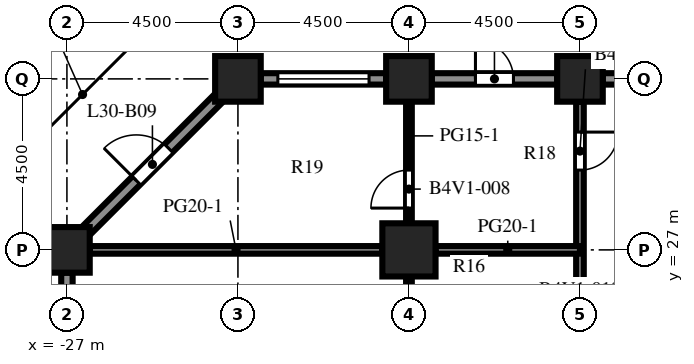
"""IFC4 building model, lengths in metres.
Left out: names, types, materials, properties, quantities, classifications, styles, units other than length and angle.
Written with IfcOpenShell. Run it as: python <this file> out.ifc"""

import sys

from ifc_helpers import new_model, si_unit, direction, frame, frame_2d, origin, origin_2d, place, context, subcontext, project, spatial, rectangle, extrude, element, fill, save


model = new_model("IFC4")
c1 = context("Model", 3, precision=1e-05, world=origin(), true_north=direction((0.0, 1.0)))
c2 = subcontext(c1, "Body", "Model", "MODEL_VIEW")
j1 = project(units=[si_unit("LENGTHUNIT", "METRE"), si_unit("PLANEANGLEUNIT", "RADIAN")], contexts=[c1])
p1 = place(None, origin())
s1 = spatial("IfcSite", under=j1, at=p1, CompositionType="ELEMENT")
p2 = place(p1, origin())
s2 = spatial("IfcBuilding", under=s1, at=p2, CompositionType="ELEMENT")
p3 = place(p2, frame((0.0, 0.0, 133.1)))
s3 = spatial("IfcBuildingStorey", under=s2, at=p3, CompositionType="ELEMENT", Elevation=133.1)
for number, where, z_axis, x_axis in (
    (1, (-27.0, 27.0, 0.0), (0.0, 0.0, 1.0), (1.0, 0.0, 0.0)),
    (2, (-22.5, 31.5, 0.0), (0.0, 0.0, 1.0), (1.0, 0.0, 0.0)),
    (3, (-18.0, 31.5, 0.0), (0.0, 0.0, 1.0), (1.0, 0.0, 0.0)),
    (4, (-13.5, 31.5, 0.0), (0.0, 0.0, 1.0), (1.0, 0.0, 0.0)),
):
    element("IfcColumn", number, at=place(p3, frame(where, z_axis=z_axis, x_axis=x_axis)), inside=s3, PredefinedType="COLUMN", context=c2, shape_type="SweptSolid", body=[
        extrude(rectangle(XDim=1.2, YDim=1.2, at=origin_2d()), origin(), (0.0, 0.0, 1.0), 4.1),
    ])
p4 = place(p3, frame((-18.0, 27.0, 0.0), z_axis=(0.0, 0.0, 1.0), x_axis=(1.0, 0.0, 0.0)))
e5 = element("IfcColumn", 5, at=p4, inside=s3, PredefinedType="COLUMN", context=c2, shape_type="SweptSolid", body=[
    extrude(rectangle(XDim=1.4, YDim=1.4, at=origin_2d()), origin(), (0.0, 0.0, 1.0), 4.1),
])
p5 = place(p3, frame((-12.9, 31.5, 0.0), z_axis=(0.0, 0.0, 1.0), x_axis=(1.0, 0.0, 0.0)))
e6 = element("IfcWall", 6, at=p5, inside=s3, PredefinedType="SOLIDWALL", context=c2, shape_type="SweptSolid", body=[
    extrude(rectangle(XDim=3.3, YDim=0.3, at=frame_2d((1.65, 0.0))), origin(), (0.0, 0.0, 1.0), 2.75),
])
p6 = place(p5, frame((0.525, 0.0, 0.8)))
e7 = element("IfcOpeningElement", 7, at=p6, cuts=e6, PredefinedType="OPENING", context=c2, shape_type="SweptSolid", body=[
    extrude(rectangle(XDim=1.2, YDim=1.7, at=frame_2d((0.6, 0.85))), frame((0.0, 0.16, 0.0), z_axis=(0.0, -1.0, 0.0), x_axis=(1.0, 0.0, 0.0)), (0.0, 0.0, 1.0), 0.32),
])
p7 = place(p3, frame((-17.4, 31.5, 0.0), z_axis=(0.0, 0.0, 1.0), x_axis=(1.0, 0.0, 0.0)))
e8 = element("IfcWall", 8, at=p7, inside=s3, PredefinedType="SOLIDWALL", context=c2, shape_type="SweptSolid", body=[
    extrude(rectangle(XDim=3.3, YDim=0.3, at=frame_2d((1.65, 0.0))), origin(), (0.0, 0.0, 1.0), 2.75),
])
p8 = place(p7, frame((1.15, 0.0, 0.0)))
e9 = element("IfcOpeningElement", 9, at=p8, cuts=e8, PredefinedType="OPENING", context=c2, shape_type="SweptSolid", body=[
    extrude(rectangle(XDim=1.0, YDim=2.2, at=frame_2d((0.5, 1.1))), frame((0.0, 0.16, 0.0), z_axis=(0.0, -1.0, 0.0), x_axis=(1.0, 0.0, 0.0)), (0.0, 0.0, 1.0), 0.32),
])
p9 = place(p3, frame((-21.9, 31.5, 0.0), z_axis=(0.0, 0.0, 1.0), x_axis=(1.0, 0.0, 0.0)))
e10 = element("IfcWall", 10, at=p9, inside=s3, PredefinedType="SOLIDWALL", context=c2, shape_type="SweptSolid", body=[
    extrude(rectangle(XDim=3.3, YDim=0.3, at=frame_2d((1.65, 0.0))), origin(), (0.0, 0.0, 1.0), 2.75),
])
p10 = place(p9, frame((0.45, 0.0, 0.8)))
e11 = element("IfcOpeningElement", 11, at=p10, cuts=e10, PredefinedType="OPENING", context=c2, shape_type="SweptSolid", body=[
    extrude(rectangle(XDim=2.4, YDim=1.7, at=frame_2d((1.2, 0.85))), frame((0.0, 0.16, 0.0), z_axis=(0.0, -1.0, 0.0), x_axis=(1.0, 0.0, 0.0)), (0.0, 0.0, 1.0), 0.32),
])
p11 = place(p3, frame((-26.506, 27.494, 0.0), z_axis=(0.0, 0.0, 1.0), x_axis=(0.707106781187, 0.707106781187, 0.0)))
e12 = element("IfcWall", 12, at=p11, inside=s3, PredefinedType="SOLIDWALL", context=c2, shape_type="SweptSolid", body=[
    extrude(rectangle(XDim=4.967, YDim=0.3, at=frame_2d((2.483, 0.0))), origin(), (0.0, 0.0, 1.0), 2.75),
])
p12 = place(p11, frame((1.884, 0.0, 0.0)))
e13 = element("IfcOpeningElement", 13, at=p12, cuts=e12, PredefinedType="OPENING", context=c2, shape_type="SweptSolid", body=[
    extrude(rectangle(XDim=1.2, YDim=2.2, at=frame_2d((0.6, 1.1))), frame((0.0, 0.16, 0.0), z_axis=(0.0, -1.0, 0.0), x_axis=(1.0, 0.0, 0.0)), (0.0, 0.0, 1.0), 0.32),
])
p13 = place(p3, frame((-27.0, 23.1, 0.0), z_axis=(0.0, 0.0, 1.0), x_axis=(0.0, 1.0, 0.0)))
e14 = element("IfcWall", 14, at=p13, inside=s3, PredefinedType="SOLIDWALL", context=c2, shape_type="SweptSolid", body=[
    extrude(rectangle(XDim=3.3, YDim=0.3, at=frame_2d((1.65, 0.0))), origin(), (0.0, 0.0, 1.0), 2.75),
])
p14 = place(p13, frame((0.45, 0.0, 0.8)))
e15 = element("IfcOpeningElement", 15, at=p14, cuts=e14, PredefinedType="OPENING", context=c2, shape_type="SweptSolid", body=[
    extrude(rectangle(XDim=2.4, YDim=1.7, at=frame_2d((1.2, 0.85))), frame((0.0, 0.16, 0.0), z_axis=(0.0, -1.0, 0.0), x_axis=(1.0, 0.0, 0.0)), (0.0, 0.0, 1.0), 0.32),
])
p15 = place(p3, frame((-18.0, 23.2, 0.0), z_axis=(0.0, 0.0, 1.0), x_axis=(0.0, 1.0, 0.0)))
e16 = element("IfcWall", 16, at=p15, inside=s3, PredefinedType="PARTITIONING", context=c2, shape_type="SweptSolid", body=[
    extrude(rectangle(XDim=3.1, YDim=0.15, at=frame_2d((1.55, 0.0))), origin(), (0.0, 0.0, 1.0), 3.65),
])
p16 = place(p15, frame((0.65, 0.0, 0.0)))
e17 = element("IfcOpeningElement", 17, at=p16, cuts=e16, PredefinedType="OPENING", context=c2, shape_type="SweptSolid", body=[
    extrude(rectangle(XDim=1.0, YDim=2.1, at=frame_2d((0.5, 1.05))), frame((0.0, 0.085, 0.0), z_axis=(0.0, -1.0, 0.0), x_axis=(1.0, 0.0, 0.0)), (0.0, 0.0, 1.0), 0.17),
])
p17 = place(p3, frame((-18.0, 27.7, 0.0), z_axis=(0.0, 0.0, 1.0), x_axis=(0.0, 1.0, 0.0)))
e18 = element("IfcWall", 18, at=p17, inside=s3, PredefinedType="PARTITIONING", context=c2, shape_type="SweptSolid", body=[
    extrude(rectangle(XDim=3.2, YDim=0.15, at=frame_2d((1.6, 0.0))), origin(), (0.0, 0.0, 1.0), 3.65),
])
p18 = place(p17, frame((0.4, 0.0, 0.0)))
e19 = element("IfcOpeningElement", 19, at=p18, cuts=e18, PredefinedType="OPENING", context=c2, shape_type="SweptSolid", body=[
    extrude(rectangle(XDim=1.0, YDim=2.1, at=frame_2d((0.5, 1.05))), frame((0.0, 0.085, 0.0), z_axis=(0.0, -1.0, 0.0), x_axis=(1.0, 0.0, 0.0)), (0.0, 0.0, 1.0), 0.17),
])
p19 = place(p3, frame((-13.5, -21.9, 0.0), z_axis=(0.0, 0.0, 1.0), x_axis=(0.0, 1.0, 0.0)))
e20 = element("IfcWall", 20, at=p19, inside=s3, PredefinedType="PARTITIONING", context=c2, shape_type="SweptSolid", body=[
    extrude(rectangle(XDim=52.8, YDim=0.2, at=frame_2d((26.4, 0.0))), origin(), (0.0, 0.0, 1.0), 3.65),
])
p20 = place(p19, frame((3.25, 0.0, 0.0)))
e21 = element("IfcOpeningElement", 21, at=p20, cuts=e20, PredefinedType="OPENING", context=c2, shape_type="SweptSolid", body=[
    extrude(rectangle(XDim=1.0, YDim=2.1, at=frame_2d((0.5, 1.05))), frame((0.0, 0.11, 0.0), z_axis=(0.0, -1.0, 0.0), x_axis=(1.0, 0.0, 0.0)), (0.0, 0.0, 1.0), 0.22),
])
p21 = place(p19, frame((10.0, 0.0, 0.0)))
e22 = element("IfcOpeningElement", 22, at=p21, cuts=e20, PredefinedType="OPENING", context=c2, shape_type="SweptSolid", body=[
    extrude(rectangle(XDim=1.0, YDim=2.1, at=frame_2d((0.5, 1.05))), frame((0.0, 0.11, 0.0), z_axis=(0.0, -1.0, 0.0), x_axis=(1.0, 0.0, 0.0)), (0.0, 0.0, 1.0), 0.22),
])
p22 = place(p19, frame((21.0, 0.0, 0.0)))
e23 = element("IfcOpeningElement", 23, at=p22, cuts=e20, PredefinedType="OPENING", context=c2, shape_type="SweptSolid", body=[
    extrude(rectangle(XDim=1.0, YDim=2.1, at=frame_2d((0.5, 1.05))), frame((0.0, 0.11, 0.0), z_axis=(0.0, -1.0, 0.0), x_axis=(1.0, 0.0, 0.0)), (0.0, 0.0, 1.0), 0.22),
])
p23 = place(p19, frame((27.75, 0.0, 0.0)))
e24 = element("IfcOpeningElement", 24, at=p23, cuts=e20, PredefinedType="OPENING", context=c2, shape_type="SweptSolid", body=[
    extrude(rectangle(XDim=1.0, YDim=2.1, at=frame_2d((0.5, 1.05))), frame((0.0, 0.11, 0.0), z_axis=(0.0, -1.0, 0.0), x_axis=(1.0, 0.0, 0.0)), (0.0, 0.0, 1.0), 0.22),
])
p24 = place(p19, frame((34.75, 0.0, 0.0)))
e25 = element("IfcOpeningElement", 25, at=p24, cuts=e20, PredefinedType="OPENING", context=c2, shape_type="SweptSolid", body=[
    extrude(rectangle(XDim=1.0, YDim=2.1, at=frame_2d((0.5, 1.05))), frame((0.0, 0.11, 0.0), z_axis=(0.0, -1.0, 0.0), x_axis=(1.0, 0.0, 0.0)), (0.0, 0.0, 1.0), 0.22),
])
p25 = place(p19, frame((42.0, 0.0, 0.0)))
e26 = element("IfcOpeningElement", 26, at=p25, cuts=e20, PredefinedType="OPENING", context=c2, shape_type="SweptSolid", body=[
    extrude(rectangle(XDim=1.0, YDim=2.1, at=frame_2d((0.5, 1.05))), frame((0.0, 0.11, 0.0), z_axis=(0.0, -1.0, 0.0), x_axis=(1.0, 0.0, 0.0)), (0.0, 0.0, 1.0), 0.22),
])
p26 = place(p19, frame((46.25, 0.0, 0.0)))
e27 = element("IfcOpeningElement", 27, at=p26, cuts=e20, PredefinedType="OPENING", context=c2, shape_type="SweptSolid", body=[
    extrude(rectangle(XDim=1.0, YDim=2.1, at=frame_2d((0.5, 1.05))), frame((0.0, 0.11, 0.0), z_axis=(0.0, -1.0, 0.0), x_axis=(1.0, 0.0, 0.0)), (0.0, 0.0, 1.0), 0.22),
])
p27 = place(p19, frame((51.0, 0.0, 0.0)))
e28 = element("IfcOpeningElement", 28, at=p27, cuts=e20, PredefinedType="OPENING", context=c2, shape_type="SweptSolid", body=[
    extrude(rectangle(XDim=1.0, YDim=2.1, at=frame_2d((0.5, 1.05))), frame((0.0, 0.11, 0.0), z_axis=(0.0, -1.0, 0.0), x_axis=(1.0, 0.0, 0.0)), (0.0, 0.0, 1.0), 0.22),
])
p28 = place(p3, frame((-26.4, 27.0, 0.0), z_axis=(0.0, 0.0, 1.0), x_axis=(1.0, 0.0, 0.0)))
e29 = element("IfcWall", 29, at=p28, inside=s3, PredefinedType="PARTITIONING", context=c2, shape_type="SweptSolid", body=[
    extrude(rectangle(XDim=7.7, YDim=0.2, at=frame_2d((3.85, 0.0))), origin(), (0.0, 0.0, 1.0), 3.65),
])
p29 = place(p3, frame((-17.3, 27.0, 0.0), z_axis=(0.0, 0.0, 1.0), x_axis=(1.0, 0.0, 0.0)))
e30 = element("IfcWall", 30, at=p29, inside=s3, PredefinedType="PARTITIONING", context=c2, shape_type="SweptSolid", body=[
    extrude(rectangle(XDim=3.8, YDim=0.2, at=frame_2d((1.9, 0.0))), origin(), (0.0, 0.0, 1.0), 3.65),
])
p30 = place(p8, origin())
e31 = element("IfcDoor", 31, at=p30, inside=s3, OperationType="SINGLE_SWING_LEFT", PredefinedType="DOOR", context=c2, shape_type="SweptSolid", body=[
    extrude(rectangle(XDim=1.0, YDim=2.2, at=frame_2d((0.5, 1.1))), frame((0.0, 0.025, 0.0), z_axis=(0.0, -1.0, 0.0), x_axis=(1.0, 0.0, 0.0)), (0.0, 0.0, 1.0), 0.05),
])
fill(e9, e31)
p31 = place(p10, origin())
e32 = element("IfcWindow", 32, at=p31, inside=s3, PartitioningType="SINGLE_PANEL", PredefinedType="WINDOW", context=c2, shape_type="SweptSolid", body=[
    extrude(rectangle(XDim=2.4, YDim=1.7, at=frame_2d((1.2, 0.85))), frame((0.0, 0.03, 0.0), z_axis=(0.0, -1.0, 0.0), x_axis=(1.0, 0.0, 0.0)), (0.0, 0.0, 1.0), 0.06),
])
fill(e11, e32)
p32 = place(p12, origin())
e33 = element("IfcDoor", 33, at=p32, inside=s3, OperationType="SINGLE_SWING_LEFT", PredefinedType="DOOR", context=c2, shape_type="SweptSolid", body=[
    extrude(rectangle(XDim=1.2, YDim=2.2, at=frame_2d((0.6, 1.1))), frame((0.0, 0.025, 0.0), z_axis=(0.0, -1.0, 0.0), x_axis=(1.0, 0.0, 0.0)), (0.0, 0.0, 1.0), 0.05),
])
fill(e13, e33)
p33 = place(p18, origin())
e34 = element("IfcDoor", 34, at=p33, inside=s3, OperationType="SINGLE_SWING_LEFT", PredefinedType="DOOR", context=c2, shape_type="SweptSolid", body=[
    extrude(rectangle(XDim=1.0, YDim=2.1, at=frame_2d((0.5, 1.05))), frame((0.0, 0.025, 0.0), z_axis=(0.0, -1.0, 0.0), x_axis=(1.0, 0.0, 0.0)), (0.0, 0.0, 1.0), 0.05),
])
fill(e19, e34)
p34 = place(p27, origin())
e35 = element("IfcDoor", 35, at=p34, inside=s3, OperationType="SINGLE_SWING_RIGHT", PredefinedType="DOOR", context=c2, shape_type="SweptSolid", body=[
    extrude(rectangle(XDim=1.0, YDim=2.1, at=frame_2d((0.5, 1.05))), frame((0.0, 0.025, 0.0), z_axis=(0.0, -1.0, 0.0), x_axis=(1.0, 0.0, 0.0)), (0.0, 0.0, 1.0), 0.05),
])
fill(e28, e35)
save(model, sys.argv[1])
